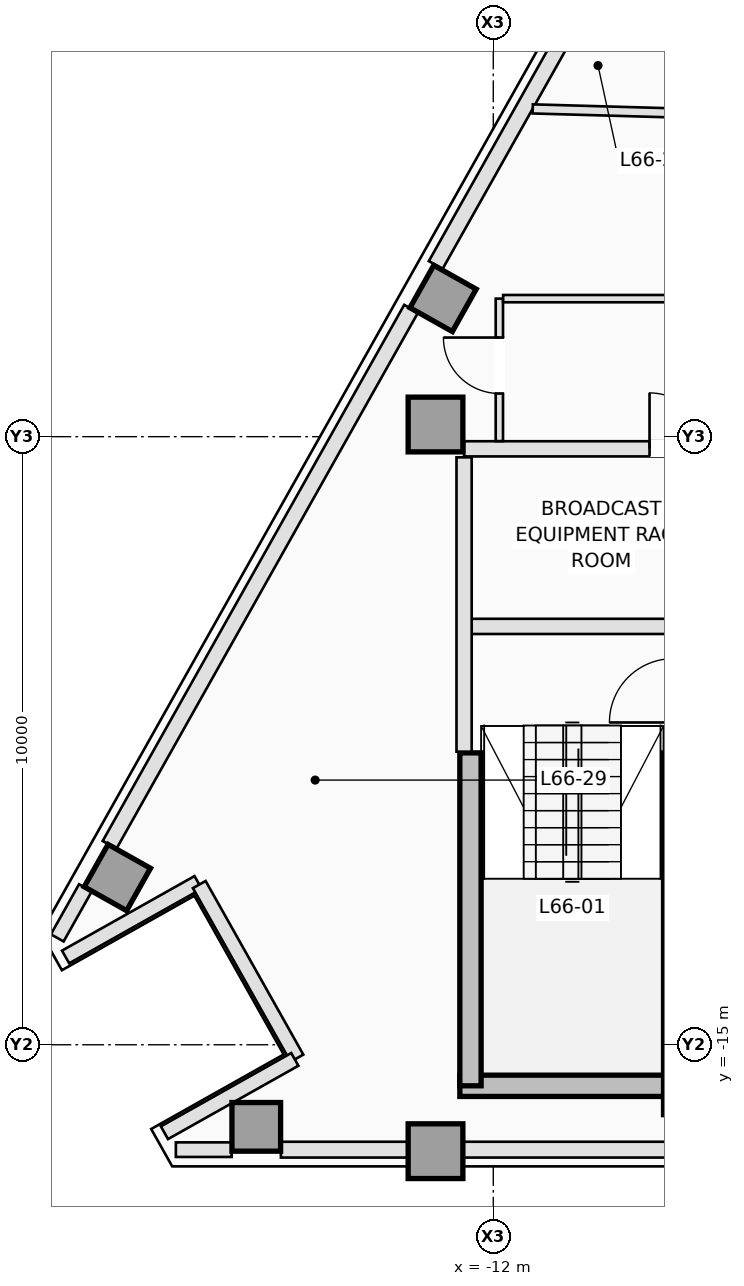
"""IFC4 building model, lengths in metres.
Left out: names, types, materials, properties, quantities, classifications, styles, units other than length and angle.
Written with IfcOpenShell. Run it as: python <this file> out.ifc"""

import sys

from ifc_helpers import new_model, si_unit, direction, frame, frame_2d, origin, origin_2d, place, context, subcontext, project, spatial, rectangle, extrude, element, fill, save


model = new_model("IFC4")
c1 = context("Model", 3, precision=1e-05, world=origin(), true_north=direction((0.0, 1.0)))
c2 = subcontext(c1, "Body", "Model", "MODEL_VIEW")
j1 = project(units=[si_unit("LENGTHUNIT", "METRE"), si_unit("PLANEANGLEUNIT", "RADIAN")], contexts=[c1])
p1 = place(None, origin())
s1 = spatial("IfcSite", under=j1, at=p1, CompositionType="ELEMENT")
p2 = place(p1, origin())
s2 = spatial("IfcBuilding", under=s1, at=p2, CompositionType="ELEMENT")
p3 = place(p2, frame((0.0, 0.0, 239.4)))
s3 = spatial("IfcBuildingStorey", under=s2, at=p3, CompositionType="ELEMENT", Elevation=239.4)
p4 = place(p3, frame((-12.55, -15.675, 0.0), z_axis=(0.0, 0.0, 1.0), x_axis=(1.0, 0.0, 0.0)))
e1 = element("IfcWall", 1, at=p4, inside=s3, PredefinedType="SHEAR", context=c2, shape_type="SweptSolid", body=[
    extrude(rectangle(XDim=3.7, YDim=0.35, at=frame_2d((1.85, 0.0))), origin(), (0.0, 0.0, 1.0), 3.5),
])
p5 = place(p3, frame((-12.375, -15.675, 0.0), z_axis=(0.0, 0.0, 1.0), x_axis=(0.0, 1.0, 0.0)))
e2 = element("IfcWall", 2, at=p5, inside=s3, PredefinedType="SHEAR", context=c2, shape_type="SweptSolid", body=[
    extrude(rectangle(XDim=5.475, YDim=0.35, at=frame_2d((2.738, 0.0))), origin(), (0.0, 0.0, 1.0), 3.5),
])
p6 = place(p3, frame((-9.025, -16.15, 0.0), z_axis=(0.0, 0.0, 1.0), x_axis=(0.0, 1.0, 0.0)))
e3 = element("IfcWall", 3, at=p6, inside=s3, PredefinedType="SHEAR", context=c2, shape_type="SweptSolid", body=[
    extrude(rectangle(XDim=5.95, YDim=0.35, at=frame_2d((2.975, 0.0))), origin(), (0.0, 0.0, 1.0), 3.5),
])
for number, where, z_axis, x_axis in (
    (4, (-12.95, -16.75, 0.0), (0.0, 0.0, 1.0), (1.0, 0.0, 0.0)),
    (5, (-12.95, -4.8, 0.0), (0.0, 0.0, 1.0), (1.0, 0.0, 0.0)),
):
    element("IfcColumn", number, at=place(p3, frame(where, z_axis=z_axis, x_axis=x_axis)), inside=s3, PredefinedType="COLUMN", context=c2, shape_type="SweptSolid", body=[
        extrude(rectangle(XDim=0.9, YDim=0.9, at=origin_2d()), origin(), (0.0, 0.0, 1.0), 3.5),
    ])
for number, where, z_axis, x_axis in (
    (6, (-15.898, -16.35, 0.0), (0.0, 0.0, 1.0), (0.0, 1.0, 0.0)),
    (7, (-12.825, -2.727, 0.0), (0.0, 0.0, 1.0), (-0.872, 0.49, 0.0)),
    (8, (-18.182, -12.25, 0.0), (0.0, 0.0, 1.0), (-0.872, 0.49, 0.0)),
):
    element("IfcColumn", number, at=place(p3, frame(where, z_axis=z_axis, x_axis=x_axis)), inside=s3, PredefinedType="COLUMN", context=c2, shape_type="SweptSolid", body=[
        extrude(rectangle(XDim=0.8, YDim=0.8, at=origin_2d()), origin(), (0.0, 0.0, 1.0), 3.5),
    ])
p7 = place(p3, frame((-16.302, -16.725, 0.0), z_axis=(0.0, 0.0, 1.0), x_axis=(-1.0, 0.0, 0.0)))
e9 = element("IfcWall", 9, at=p7, inside=s3, PredefinedType="STANDARD", context=c2, shape_type="SweptSolid", body=[
    extrude(rectangle(XDim=0.917, YDim=0.24, at=frame_2d((0.459, 0.0))), origin(), (0.0, 0.0, 1.0), 3.25),
])
p8 = place(p3, frame((-4.22, -16.725, 0.0), z_axis=(0.0, 0.0, 1.0), x_axis=(-1.0, 0.0, 0.0)))
e10 = element("IfcWall", 10, at=p8, inside=s3, PredefinedType="STANDARD", context=c2, shape_type="SweptSolid", body=[
    extrude(rectangle(XDim=11.273, YDim=0.26, at=frame_2d((5.636, 0.0))), origin(), (0.0, 0.0, 1.0), 2.79),
])
p9 = place(p3, frame((-19.171, -13.242, 0.0), z_axis=(0.0, 0.0, 1.0), x_axis=(0.490199895283, 0.871610040479, 0.0)))
e11 = element("IfcWall", 11, at=p9, inside=s3, PredefinedType="STANDARD", context=c2, shape_type="SweptSolid", body=[
    extrude(rectangle(XDim=0.945, YDim=0.24, at=frame_2d((0.472, 0.0))), origin(), (0.0, 0.0, 1.0), 3.25),
])
p10 = place(p3, frame((-18.311, -11.713, 0.0), z_axis=(0.0, 0.0, 1.0), x_axis=(0.490266968583, 0.871572314565, 0.0)))
e12 = element("IfcWall", 12, at=p10, inside=s3, PredefinedType="STANDARD", context=c2, shape_type="SweptSolid", body=[
    extrude(rectangle(XDim=10.116, YDim=0.26, at=frame_2d((5.058, 0.0))), origin(), (0.0, 0.0, 1.0), 3.25),
])
p11 = place(p3, frame((-12.946, -2.177, 0.0), z_axis=(0.0, 0.0, 1.0), x_axis=(0.490244825075, 0.871584770109, 0.0)))
e13 = element("IfcWall", 13, at=p11, inside=s3, PredefinedType="STANDARD", context=c2, shape_type="SweptSolid", body=[
    extrude(rectangle(XDim=4.237, YDim=0.26, at=frame_2d((2.119, 0.0))), origin(), (0.0, 0.0, 1.0), 3.25),
])
p12 = place(p3, frame((-19.033, -13.556, 0.0), z_axis=(0.0, 0.0, 1.0), x_axis=(0.871588577066, 0.490238056792, 0.0)))
e14 = element("IfcWall", 14, at=p12, inside=s3, PredefinedType="STANDARD", context=c2, shape_type="SweptSolid", body=[
    extrude(rectangle(XDim=2.5, YDim=0.24, at=frame_2d((1.25, 0.0))), origin(), (0.0, 0.0, 1.0), 3.25),
])
p13 = place(p3, frame((-16.835, -12.366, 0.0), z_axis=(0.0, 0.0, 1.0), x_axis=(0.490293083368, -0.871557624258, 0.0)))
e15 = element("IfcWall", 15, at=p13, inside=s3, PredefinedType="STANDARD", context=c2, shape_type="SweptSolid", body=[
    extrude(rectangle(XDim=3.276, YDim=0.24, at=frame_2d((1.638, 0.0))), origin(), (0.0, 0.0, 1.0), 2.79),
])
p14 = place(p3, frame((-15.264, -15.24, 0.0), z_axis=(0.0, 0.0, 1.0), x_axis=(-0.87157023615, -0.490270663468, 0.0)))
e16 = element("IfcWall", 16, at=p14, inside=s3, PredefinedType="STANDARD", context=c2, shape_type="SweptSolid", body=[
    extrude(rectangle(XDim=2.46, YDim=0.24, at=frame_2d((1.23, 0.0))), origin(), (0.0, 0.0, 1.0), 3.25),
])
p15 = place(p3, frame((-12.38, -8.12, 0.0), z_axis=(0.0, 0.0, 1.0), x_axis=(1.0, 0.0, 0.0)))
e17 = element("IfcWall", 17, at=p15, inside=s3, PredefinedType="PARTITIONING", context=c2, shape_type="SweptSolid", body=[
    extrude(rectangle(XDim=3.22, YDim=0.25, at=frame_2d((1.61, 0.0))), origin(), (0.0, 0.0, 1.0), 3.25),
])
p16 = place(p3, frame((-12.48, -10.18, 0.0), z_axis=(0.0, 0.0, 1.0), x_axis=(0.0, 1.0, 0.0)))
e18 = element("IfcWall", 18, at=p16, inside=s3, PredefinedType="PARTITIONING", context=c2, shape_type="SweptSolid", body=[
    extrude(rectangle(XDim=4.84, YDim=0.25, at=frame_2d((2.42, 0.0))), origin(), (0.0, 0.0, 1.0), 3.25),
])
p17 = place(p3, frame((-12.48, -5.2, 0.0), z_axis=(0.0, 0.0, 1.0), x_axis=(1.0, 0.0, 0.0)))
e19 = element("IfcWall", 19, at=p17, inside=s3, PredefinedType="PARTITIONING", context=c2, shape_type="SweptSolid", body=[
    extrude(rectangle(XDim=8.278, YDim=0.25, at=frame_2d((4.139, 0.0))), origin(), (0.0, 0.0, 1.0), 3.25),
])
p18 = place(p17, frame((3.05, 0.0, 0.0)))
e20 = element("IfcOpeningElement", 20, at=p18, cuts=e19, PredefinedType="OPENING", context=c2, shape_type="SweptSolid", body=[
    extrude(rectangle(XDim=0.92, YDim=2.12, at=frame_2d((0.46, 1.06))), frame((0.0, 0.135, 0.0), z_axis=(0.0, -1.0, 0.0), x_axis=(1.0, 0.0, 0.0)), (0.0, 0.0, 1.0), 0.27),
])
p19 = place(p17, frame((6.15, 0.0, 0.0)))
e21 = element("IfcOpeningElement", 21, at=p19, cuts=e19, PredefinedType="OPENING", context=c2, shape_type="SweptSolid", body=[
    extrude(rectangle(XDim=0.92, YDim=2.12, at=frame_2d((0.46, 1.06))), frame((0.0, 0.135, 0.0), z_axis=(0.0, -1.0, 0.0), x_axis=(1.0, 0.0, 0.0)), (0.0, 0.0, 1.0), 0.27),
])
p20 = place(p3, frame((-11.9, -5.073, 0.0), z_axis=(0.0, 0.0, 1.0), x_axis=(0.0, 1.0, 0.0)))
e22 = element("IfcWall", 22, at=p20, inside=s3, PredefinedType="PARTITIONING", context=c2, shape_type="SweptSolid", body=[
    extrude(rectangle(XDim=2.343, YDim=0.12, at=frame_2d((1.171, 0.0))), origin(), (0.0, 0.0, 1.0), 3.25),
])
p21 = place(p20, frame((0.783, 0.0, 0.0)))
e23 = element("IfcOpeningElement", 23, at=p21, cuts=e22, PredefinedType="OPENING", context=c2, shape_type="SweptSolid", body=[
    extrude(rectangle(XDim=0.92, YDim=2.12, at=frame_2d((0.46, 1.06))), frame((0.0, 0.07, 0.0), z_axis=(0.0, -1.0, 0.0), x_axis=(1.0, 0.0, 0.0)), (0.0, 0.0, 1.0), 0.14),
])
p22 = place(p3, frame((-11.838, -2.73, 0.0), z_axis=(0.0, 0.0, 1.0), x_axis=(1.0, 0.0, 0.0)))
e24 = element("IfcWall", 24, at=p22, inside=s3, PredefinedType="PARTITIONING", context=c2, shape_type="SweptSolid", body=[
    extrude(rectangle(XDim=3.388, YDim=0.12, at=frame_2d((1.694, 0.0))), origin(), (0.0, 0.0, 1.0), 3.25),
])
p23 = place(p3, frame((-8.56, 0.311, 0.0), z_axis=(0.0, 0.0, 1.0), x_axis=(-0.999598621545, 0.028330121884, 0.0)))
e25 = element("IfcWall", 25, at=p23, inside=s3, PredefinedType="PARTITIONING", context=c2, shape_type="SweptSolid", body=[
    extrude(rectangle(XDim=2.792, YDim=0.15, at=frame_2d((1.396, 0.0))), origin(), (0.0, 0.0, 1.0), 3.25),
])
p24 = place(p18, origin())
e26 = element("IfcDoor", 26, at=p24, inside=s3, OperationType="SINGLE_SWING_LEFT", PredefinedType="DOOR", context=c2, shape_type="SweptSolid", body=[
    extrude(rectangle(XDim=0.92, YDim=2.12, at=frame_2d((0.46, 1.06))), frame((0.0, 0.025, 0.0), z_axis=(0.0, -1.0, 0.0), x_axis=(1.0, 0.0, 0.0)), (0.0, 0.0, 1.0), 0.05),
])
fill(e20, e26)
p25 = place(p21, origin())
e27 = element("IfcDoor", 27, at=p25, inside=s3, OperationType="SINGLE_SWING_RIGHT", PredefinedType="DOOR", context=c2, shape_type="SweptSolid", body=[
    extrude(rectangle(XDim=0.92, YDim=2.12, at=frame_2d((0.46, 1.06))), frame((0.0, 0.025, 0.0), z_axis=(0.0, -1.0, 0.0), x_axis=(1.0, 0.0, 0.0)), (0.0, 0.0, 1.0), 0.05),
])
fill(e23, e27)
save(model, sys.argv[1])
